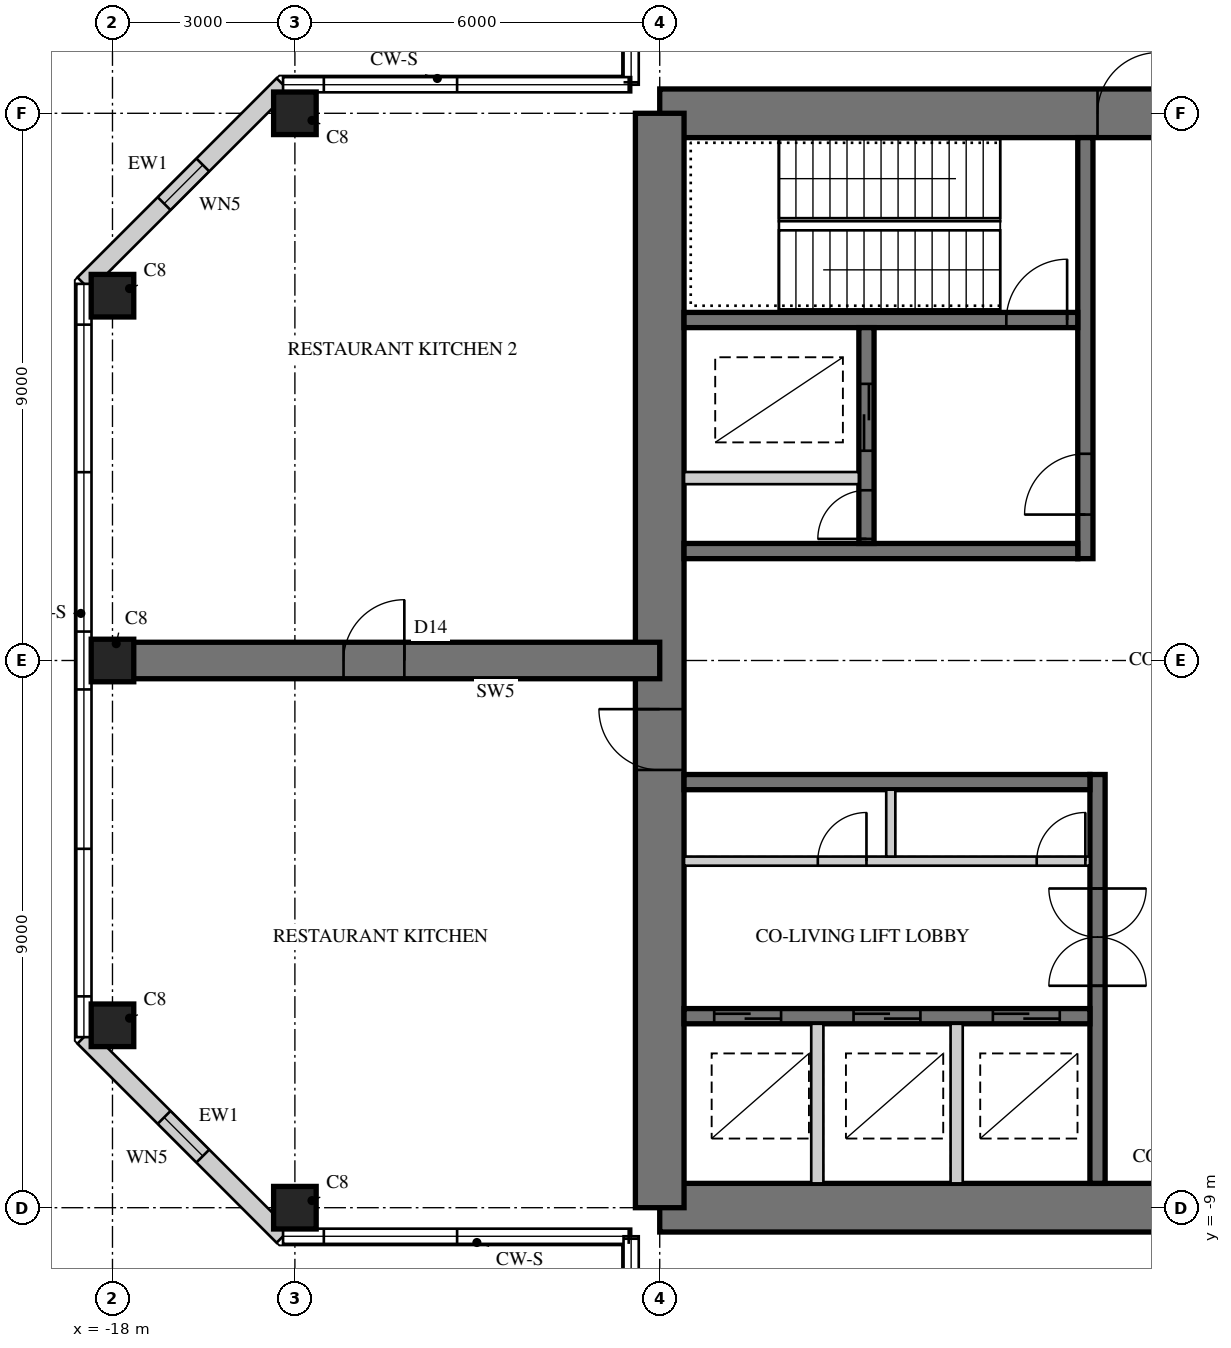
"""IFC4 building model, lengths in metres.
Left out: names, types, materials, properties, quantities, classifications, styles, units other than length and angle.
Written with IfcOpenShell. Run it as: python <this file> out.ifc"""

import sys

from ifc_helpers import new_model, si_unit, direction, frame, frame_2d, origin, origin_2d, place, context, subcontext, project, spatial, rectangle, hollow_rectangle, extrude, element, fill, save


model = new_model("IFC4")
c1 = context("Model", 3, precision=1e-05, world=origin(), true_north=direction((0.0, 1.0)))
c2 = subcontext(c1, "Body", "Model", "MODEL_VIEW")
j1 = project(units=[si_unit("LENGTHUNIT", "METRE"), si_unit("PLANEANGLEUNIT", "RADIAN")], contexts=[c1])
p1 = place(None, origin())
s1 = spatial("IfcSite", under=j1, at=p1, CompositionType="ELEMENT")
p2 = place(p1, origin())
s2 = spatial("IfcBuilding", under=s1, at=p2, CompositionType="ELEMENT")
p3 = place(p2, frame((0.0, 0.0, 288.3)))
s3 = spatial("IfcBuildingStorey", under=s2, at=p3, CompositionType="ELEMENT", Elevation=288.3)
p4 = place(p3, frame((9.0, 9.0, 0.0), z_axis=(0.0, 0.0, 1.0), x_axis=(-1.0, 0.0, 0.0)))
e1 = element("IfcWall", 1, at=p4, inside=s3, PredefinedType="SHEAR", context=c2, shape_type="SweptSolid", body=[
    extrude(rectangle(XDim=18.0, YDim=0.8, at=frame_2d((9.0, 0.0))), origin(), (0.0, 0.0, 1.0), 5.0),
])
p5 = place(p4, frame((9.8, 0.0, 0.0)))
e2 = element("IfcOpeningElement", 2, at=p5, cuts=e1, PredefinedType="OPENING", context=c2, shape_type="SweptSolid", body=[
    extrude(rectangle(XDim=1.0, YDim=2.4, at=frame_2d((0.5, 1.2))), frame((0.0, 0.41, 0.0), z_axis=(0.0, -1.0, 0.0), x_axis=(1.0, 0.0, 0.0)), (0.0, 0.0, 1.0), 0.82),
])
p6 = place(p3, frame((-9.0, -9.0, 0.0), z_axis=(0.0, 0.0, 1.0), x_axis=(1.0, 0.0, 0.0)))
e3 = element("IfcWall", 3, at=p6, inside=s3, PredefinedType="SHEAR", context=c2, shape_type="SweptSolid", body=[
    extrude(rectangle(XDim=18.0, YDim=0.8, at=frame_2d((9.0, 0.0))), origin(), (0.0, 0.0, 1.0), 5.0),
])
p7 = place(p6, frame((9.8, 0.0, 0.0)))
e4 = element("IfcOpeningElement", 4, at=p7, cuts=e3, PredefinedType="OPENING", context=c2, shape_type="SweptSolid", body=[
    extrude(rectangle(XDim=1.0, YDim=2.4, at=frame_2d((0.5, 1.2))), frame((0.0, 0.41, 0.0), z_axis=(0.0, -1.0, 0.0), x_axis=(1.0, 0.0, 0.0)), (0.0, 0.0, 1.0), 0.82),
])
p8 = place(p3, frame((-9.0, 9.0, 0.0), z_axis=(0.0, 0.0, 1.0), x_axis=(0.0, -1.0, 0.0)))
e5 = element("IfcWall", 5, at=p8, inside=s3, PredefinedType="SHEAR", context=c2, shape_type="SweptSolid", body=[
    extrude(rectangle(XDim=18.0, YDim=0.8, at=frame_2d((9.0, 0.0))), origin(), (0.0, 0.0, 1.0), 5.0),
])
p9 = place(p8, frame((9.8, 0.0, 0.0)))
e6 = element("IfcOpeningElement", 6, at=p9, cuts=e5, PredefinedType="OPENING", context=c2, shape_type="SweptSolid", body=[
    extrude(rectangle(XDim=1.0, YDim=2.4, at=frame_2d((0.5, 1.2))), frame((0.0, 0.41, 0.0), z_axis=(0.0, -1.0, 0.0), x_axis=(1.0, 0.0, 0.0)), (0.0, 0.0, 1.0), 0.82),
])
p10 = place(p3, frame((-2.0, 1.675, 0.0), z_axis=(0.0, 0.0, 1.0), x_axis=(0.0, 1.0, 0.0)))
e7 = element("IfcWall", 7, at=p10, inside=s3, PredefinedType="SHEAR", context=c2, shape_type="SweptSolid", body=[
    extrude(rectangle(XDim=6.925, YDim=0.25, at=frame_2d((3.462, 0.0))), origin(), (0.0, 0.0, 1.0), 5.0),
])
p11 = place(p10, frame((0.725, 0.0, 0.0)))
e8 = element("IfcOpeningElement", 8, at=p11, cuts=e7, PredefinedType="OPENING", context=c2, shape_type="SweptSolid", body=[
    extrude(rectangle(XDim=1.0, YDim=2.1, at=frame_2d((0.5, 1.05))), frame((0.0, 0.135, 0.0), z_axis=(0.0, -1.0, 0.0), x_axis=(1.0, 0.0, 0.0)), (0.0, 0.0, 1.0), 0.27),
])
p12 = place(p3, frame((-2.125, 1.8, 0.0), z_axis=(0.0, 0.0, 1.0), x_axis=(-1.0, 0.0, 0.0)))
e9 = element("IfcWall", 9, at=p12, inside=s3, PredefinedType="SHEAR", context=c2, shape_type="SweptSolid", body=[
    extrude(rectangle(XDim=6.475, YDim=0.25, at=frame_2d((3.238, 0.0))), origin(), (0.0, 0.0, 1.0), 5.0),
])
p13 = place(p3, frame((-2.125, 5.6, 0.0), z_axis=(0.0, 0.0, 1.0), x_axis=(-1.0, 0.0, 0.0)))
e10 = element("IfcWall", 10, at=p13, inside=s3, PredefinedType="SHEAR", context=c2, shape_type="SweptSolid", body=[
    extrude(rectangle(XDim=6.475, YDim=0.25, at=frame_2d((3.238, 0.0))), origin(), (0.0, 0.0, 1.0), 5.0),
])
p14 = place(p13, frame((0.175, 0.0, 0.0)))
e11 = element("IfcOpeningElement", 11, at=p14, cuts=e10, PredefinedType="OPENING", context=c2, shape_type="SweptSolid", body=[
    extrude(rectangle(XDim=1.0, YDim=2.1, at=frame_2d((0.5, 1.05))), frame((0.0, 0.135, 0.0), z_axis=(0.0, -1.0, 0.0), x_axis=(1.0, 0.0, 0.0)), (0.0, 0.0, 1.0), 0.27),
])
p15 = place(p3, frame((-5.6, 1.925, 0.0), z_axis=(0.0, 0.0, 1.0), x_axis=(0.0, 1.0, 0.0)))
e12 = element("IfcWall", 12, at=p15, inside=s3, PredefinedType="SHEAR", context=c2, shape_type="SweptSolid", body=[
    extrude(rectangle(XDim=3.55, YDim=0.25, at=frame_2d((1.775, 0.0))), origin(), (0.0, 0.0, 1.0), 5.0),
])
p16 = place(p15, frame((1.525, 0.0, 0.0)))
e13 = element("IfcOpeningElement", 13, at=p16, cuts=e12, PredefinedType="OPENING", context=c2, shape_type="SweptSolid", body=[
    extrude(rectangle(XDim=1.1, YDim=2.2, at=frame_2d((0.55, 1.1))), frame((0.0, 0.135, 0.0), z_axis=(0.0, -1.0, 0.0), x_axis=(1.0, 0.0, 0.0)), (0.0, 0.0, 1.0), 0.27),
])
p17 = place(p15, frame((0.075, 0.0, 0.0)))
e14 = element("IfcOpeningElement", 14, at=p17, cuts=e12, PredefinedType="OPENING", context=c2, shape_type="SweptSolid", body=[
    extrude(rectangle(XDim=0.8, YDim=2.1, at=frame_2d((0.4, 1.05))), frame((0.0, 0.135, 0.0), z_axis=(0.0, -1.0, 0.0), x_axis=(1.0, 0.0, 0.0)), (0.0, 0.0, 1.0), 0.27),
])
p18 = place(p3, frame((-5.725, 3.0, 0.0), z_axis=(0.0, 0.0, 1.0), x_axis=(-1.0, 0.0, 0.0)))
e15 = element("IfcWall", 15, at=p18, inside=s3, PredefinedType="PARTITIONING", context=c2, shape_type="SweptSolid", body=[
    extrude(rectangle(XDim=2.875, YDim=0.2, at=frame_2d((1.438, 0.0))), origin(), (0.0, 0.0, 1.0), 5.0),
])
p19 = place(p3, frame((-1.8, -1.875, 0.0), z_axis=(0.0, 0.0, 1.0), x_axis=(0.0, -1.0, 0.0)))
e16 = element("IfcWall", 16, at=p19, inside=s3, PredefinedType="SHEAR", context=c2, shape_type="SweptSolid", body=[
    extrude(rectangle(XDim=6.725, YDim=0.25, at=frame_2d((3.363, 0.0))), origin(), (0.0, 0.0, 1.0), 5.0),
])
p20 = place(p19, frame((1.875, 0.0, 0.0)))
e17 = element("IfcOpeningElement", 17, at=p20, cuts=e16, PredefinedType="OPENING", context=c2, shape_type="SweptSolid", body=[
    extrude(rectangle(XDim=1.6, YDim=2.4, at=frame_2d((0.8, 1.2))), frame((0.0, 0.135, 0.0), z_axis=(0.0, -1.0, 0.0), x_axis=(1.0, 0.0, 0.0)), (0.0, 0.0, 1.0), 0.27),
])
p21 = place(p3, frame((-1.925, -2.0, 0.0), z_axis=(0.0, 0.0, 1.0), x_axis=(-1.0, 0.0, 0.0)))
e18 = element("IfcWall", 18, at=p21, inside=s3, PredefinedType="SHEAR", context=c2, shape_type="SweptSolid", body=[
    extrude(rectangle(XDim=6.675, YDim=0.25, at=frame_2d((3.337, 0.0))), origin(), (0.0, 0.0, 1.0), 5.0),
])
p22 = place(p3, frame((-1.925, -5.85, 0.0), z_axis=(0.0, 0.0, 1.0), x_axis=(-1.0, 0.0, 0.0)))
e19 = element("IfcWall", 19, at=p22, inside=s3, PredefinedType="SHEAR", context=c2, shape_type="SweptSolid", body=[
    extrude(rectangle(XDim=6.675, YDim=0.25, at=frame_2d((3.337, 0.0))), origin(), (0.0, 0.0, 1.0), 5.0),
])
p23 = place(p22, frame((0.496, 0.0, 0.0)))
e20 = element("IfcOpeningElement", 20, at=p23, cuts=e19, PredefinedType="OPENING", context=c2, shape_type="SweptSolid", body=[
    extrude(rectangle(XDim=1.1, YDim=2.2, at=frame_2d((0.55, 1.1))), frame((0.0, 0.135, 0.0), z_axis=(0.0, -1.0, 0.0), x_axis=(1.0, 0.0, 0.0)), (0.0, 0.0, 1.0), 0.27),
])
p24 = place(p22, frame((2.788, 0.0, 0.0)))
e21 = element("IfcOpeningElement", 21, at=p24, cuts=e19, PredefinedType="OPENING", context=c2, shape_type="SweptSolid", body=[
    extrude(rectangle(XDim=1.1, YDim=2.2, at=frame_2d((0.55, 1.1))), frame((0.0, 0.135, 0.0), z_axis=(0.0, -1.0, 0.0), x_axis=(1.0, 0.0, 0.0)), (0.0, 0.0, 1.0), 0.27),
])
p25 = place(p22, frame((5.079, 0.0, 0.0)))
e22 = element("IfcOpeningElement", 22, at=p25, cuts=e19, PredefinedType="OPENING", context=c2, shape_type="SweptSolid", body=[
    extrude(rectangle(XDim=1.1, YDim=2.2, at=frame_2d((0.55, 1.1))), frame((0.0, 0.135, 0.0), z_axis=(0.0, -1.0, 0.0), x_axis=(1.0, 0.0, 0.0)), (0.0, 0.0, 1.0), 0.27),
])
p26 = place(p3, frame((-1.925, -3.3, 0.0), z_axis=(0.0, 0.0, 1.0), x_axis=(-1.0, 0.0, 0.0)))
e23 = element("IfcWall", 23, at=p26, inside=s3, PredefinedType="PARTITIONING", context=c2, shape_type="SweptSolid", body=[
    extrude(rectangle(XDim=6.675, YDim=0.15, at=frame_2d((3.337, 0.0))), origin(), (0.0, 0.0, 1.0), 5.0),
])
p27 = place(p26, frame((0.075, 0.0, 0.0)))
e24 = element("IfcOpeningElement", 24, at=p27, cuts=e23, PredefinedType="OPENING", context=c2, shape_type="SweptSolid", body=[
    extrude(rectangle(XDim=0.8, YDim=2.1, at=frame_2d((0.4, 1.05))), frame((0.0, 0.085, 0.0), z_axis=(0.0, -1.0, 0.0), x_axis=(1.0, 0.0, 0.0)), (0.0, 0.0, 1.0), 0.17),
])
p28 = place(p26, frame((3.675, 0.0, 0.0)))
e25 = element("IfcOpeningElement", 25, at=p28, cuts=e23, PredefinedType="OPENING", context=c2, shape_type="SweptSolid", body=[
    extrude(rectangle(XDim=0.8, YDim=2.1, at=frame_2d((0.4, 1.05))), frame((0.0, 0.085, 0.0), z_axis=(0.0, -1.0, 0.0), x_axis=(1.0, 0.0, 0.0)), (0.0, 0.0, 1.0), 0.17),
])
p29 = place(p3, frame((-5.2, -2.125, 0.0), z_axis=(0.0, 0.0, 1.0), x_axis=(0.0, -1.0, 0.0)))
e26 = element("IfcWall", 26, at=p29, inside=s3, PredefinedType="PARTITIONING", context=c2, shape_type="SweptSolid", body=[
    extrude(rectangle(XDim=1.1, YDim=0.15, at=frame_2d((0.55, 0.0))), origin(), (0.0, 0.0, 1.0), 5.0),
])
for number, where, z_axis, x_axis in (
    (27, (-4.117, -5.975, 0.0), (0.0, 0.0, 1.0), (0.0, -1.0, 0.0)),
    (28, (-6.408, -5.975, 0.0), (0.0, 0.0, 1.0), (0.0, -1.0, 0.0)),
):
    element("IfcWall", number, at=place(p3, frame(where, z_axis=z_axis, x_axis=x_axis)), inside=s3, PredefinedType="PARTITIONING", context=c2, shape_type="SweptSolid", body=[
        extrude(rectangle(XDim=2.625, YDim=0.2, at=frame_2d((1.312, 0.0))), origin(), (0.0, 0.0, 1.0), 5.0),
    ])
p30 = place(p3, frame((-9.0, 0.0, 0.0), z_axis=(0.0, 0.0, 1.0), x_axis=(-1.0, 0.0, 0.0)))
e29 = element("IfcWall", 29, at=p30, inside=s3, PredefinedType="SHEAR", context=c2, shape_type="SweptSolid", body=[
    extrude(rectangle(XDim=9.0, YDim=0.6, at=frame_2d((4.5, 0.0))), origin(), (0.0, 0.0, 1.0), 5.0),
])
p31 = place(p30, frame((4.2, 0.0, 0.0)))
e30 = element("IfcOpeningElement", 30, at=p31, cuts=e29, PredefinedType="OPENING", context=c2, shape_type="SweptSolid", body=[
    extrude(rectangle(XDim=1.0, YDim=2.2, at=frame_2d((0.5, 1.1))), frame((0.0, 0.31, 0.0), z_axis=(0.0, -1.0, 0.0), x_axis=(1.0, 0.0, 0.0)), (0.0, 0.0, 1.0), 0.62),
])
for number, where, z_axis, x_axis in (
    (31, (-15.0, 9.0, 0.0), (0.0, 0.0, 1.0), (1.0, 0.0, 0.0)),
    (32, (-15.0, -9.0, 0.0), (0.0, 0.0, 1.0), (1.0, 0.0, 0.0)),
    (33, (-18.0, 6.0, 0.0), (0.0, 0.0, 1.0), (1.0, 0.0, 0.0)),
    (34, (-18.0, 0.0, 0.0), (0.0, 0.0, 1.0), (1.0, 0.0, 0.0)),
    (35, (-18.0, -6.0, 0.0), (0.0, 0.0, 1.0), (1.0, 0.0, 0.0)),
):
    element("IfcColumn", number, at=place(p3, frame(where, z_axis=z_axis, x_axis=x_axis)), inside=s3, PredefinedType="COLUMN", context=c2, shape_type="SweptSolid", body=[
        extrude(rectangle(XDim=0.7, YDim=0.7, at=origin_2d()), origin(), (0.0, 0.0, 1.0), 5.0),
    ])
p32 = place(p3, frame((-15.195, 9.47, 0.0), z_axis=(0.0, 0.0, 1.0), x_axis=(-0.707106781187, -0.707106781187, 0.0)))
e36 = element("IfcWall", 36, at=p32, inside=s3, PredefinedType="SOLIDWALL", context=c2, shape_type="SweptSolid", body=[
    extrude(rectangle(XDim=4.632, YDim=0.3, at=frame_2d((2.316, 0.0))), origin(), (0.0, 0.0, 1.0), 4.75),
])
p33 = place(p32, frame((1.866, 0.0, 0.3)))
e37 = element("IfcOpeningElement", 37, at=p33, cuts=e36, PredefinedType="OPENING", context=c2, shape_type="SweptSolid", body=[
    extrude(rectangle(XDim=0.9, YDim=2.4, at=frame_2d((0.45, 1.2))), frame((0.0, 0.16, 0.0), z_axis=(0.0, -1.0, 0.0), x_axis=(1.0, 0.0, 0.0)), (0.0, 0.0, 1.0), 0.32),
])
p34 = place(p3, frame((-18.47, -6.195, 0.0), z_axis=(0.0, 0.0, 1.0), x_axis=(0.707106781187, -0.707106781187, 0.0)))
e38 = element("IfcWall", 38, at=p34, inside=s3, PredefinedType="SOLIDWALL", context=c2, shape_type="SweptSolid", body=[
    extrude(rectangle(XDim=4.632, YDim=0.3, at=frame_2d((2.316, 0.0))), origin(), (0.0, 0.0, 1.0), 4.75),
])
p35 = place(p34, frame((1.866, 0.0, 0.3)))
e39 = element("IfcOpeningElement", 39, at=p35, cuts=e38, PredefinedType="OPENING", context=c2, shape_type="SweptSolid", body=[
    extrude(rectangle(XDim=0.9, YDim=2.4, at=frame_2d((0.45, 1.2))), frame((0.0, 0.16, 0.0), z_axis=(0.0, -1.0, 0.0), x_axis=(1.0, 0.0, 0.0)), (0.0, 0.0, 1.0), 0.32),
])
p36 = place(p33, origin())
e40 = element("IfcWindow", 40, at=p36, inside=s3, PartitioningType="SINGLE_PANEL", PredefinedType="WINDOW", context=c2, shape_type="SweptSolid", body=[
    extrude(hollow_rectangle(XDim=0.9, YDim=2.4, WallThickness=0.06, at=frame_2d((0.45, 1.2))), frame((0.0, 0.03, 0.0), z_axis=(0.0, -1.0, 0.0), x_axis=(1.0, 0.0, 0.0)), (0.0, 0.0, 1.0), 0.06),
    extrude(rectangle(XDim=0.779, YDim=2.279, at=frame_2d((0.45, 1.2))), frame((0.0, 0.03, 0.0), z_axis=(0.0, -1.0, 0.0), x_axis=(1.0, 0.0, 0.0)), (0.0, 0.0, 1.0), 0.06),
])
fill(e37, e40)
p37 = place(p35, origin())
e41 = element("IfcWindow", 41, at=p37, inside=s3, PartitioningType="SINGLE_PANEL", PredefinedType="WINDOW", context=c2, shape_type="SweptSolid", body=[
    extrude(hollow_rectangle(XDim=0.9, YDim=2.4, WallThickness=0.06, at=frame_2d((0.45, 1.2))), frame((0.0, 0.03, 0.0), z_axis=(0.0, -1.0, 0.0), x_axis=(1.0, 0.0, 0.0)), (0.0, 0.0, 1.0), 0.06),
    extrude(rectangle(XDim=0.779, YDim=2.279, at=frame_2d((0.45, 1.2))), frame((0.0, 0.03, 0.0), z_axis=(0.0, -1.0, 0.0), x_axis=(1.0, 0.0, 0.0)), (0.0, 0.0, 1.0), 0.06),
])
fill(e39, e41)
p38 = place(p31, frame((1.0, 0.0, 0.0), z_axis=(0.0, 0.0, 1.0), x_axis=(-1.0, 0.0, 0.0)))
e42 = element("IfcDoor", 42, at=p38, inside=s3, OperationType="SINGLE_SWING_RIGHT", PredefinedType="DOOR", context=c2, shape_type="SweptSolid", body=[
    extrude(rectangle(XDim=1.0, YDim=2.2, at=frame_2d((0.5, 1.1))), frame((0.0, 0.025, 0.0), z_axis=(0.0, -1.0, 0.0), x_axis=(1.0, 0.0, 0.0)), (0.0, 0.0, 1.0), 0.05),
])
fill(e30, e42)
p39 = place(p5, frame((1.0, 0.0, 0.0), z_axis=(0.0, 0.0, 1.0), x_axis=(-1.0, 0.0, 0.0)))
e43 = element("IfcDoor", 43, at=p39, inside=s3, OperationType="SINGLE_SWING_RIGHT", PredefinedType="DOOR", context=c2, shape_type="SweptSolid", body=[
    extrude(rectangle(XDim=1.0, YDim=2.4, at=frame_2d((0.5, 1.2))), frame((0.0, -0.005, 0.0), z_axis=(0.0, -1.0, 0.0), x_axis=(1.0, 0.0, 0.0)), (0.0, 0.0, 1.0), 0.05),
])
fill(e2, e43)
p40 = place(p9, frame((1.0, 0.0, 0.0), z_axis=(0.0, 0.0, 1.0), x_axis=(-1.0, 0.0, 0.0)))
e44 = element("IfcDoor", 44, at=p40, inside=s3, OperationType="SINGLE_SWING_RIGHT", PredefinedType="DOOR", context=c2, shape_type="SweptSolid", body=[
    extrude(rectangle(XDim=1.0, YDim=2.4, at=frame_2d((0.5, 1.2))), frame((0.0, -0.005, 0.0), z_axis=(0.0, -1.0, 0.0), x_axis=(1.0, 0.0, 0.0)), (0.0, 0.0, 1.0), 0.05),
])
fill(e6, e44)
p41 = place(p11, origin())
e45 = element("IfcDoor", 45, at=p41, inside=s3, OperationType="SINGLE_SWING_LEFT", PredefinedType="DOOR", context=c2, shape_type="SweptSolid", body=[
    extrude(rectangle(XDim=1.0, YDim=2.1, at=frame_2d((0.5, 1.05))), frame((0.0, 0.025, 0.0), z_axis=(0.0, -1.0, 0.0), x_axis=(1.0, 0.0, 0.0)), (0.0, 0.0, 1.0), 0.05),
])
fill(e8, e45)
p42 = place(p14, frame((1.0, 0.0, 0.0), z_axis=(0.0, 0.0, 1.0), x_axis=(-1.0, 0.0, 0.0)))
e46 = element("IfcDoor", 46, at=p42, inside=s3, OperationType="SINGLE_SWING_RIGHT", PredefinedType="DOOR", context=c2, shape_type="SweptSolid", body=[
    extrude(rectangle(XDim=1.0, YDim=2.1, at=frame_2d((0.5, 1.05))), frame((0.0, 0.025, 0.0), z_axis=(0.0, -1.0, 0.0), x_axis=(1.0, 0.0, 0.0)), (0.0, 0.0, 1.0), 0.05),
])
fill(e11, e46)
p43 = place(p16, origin())
e47 = element("IfcDoor", 47, at=p43, inside=s3, OperationType="DOUBLE_DOOR_SLIDING", PredefinedType="DOOR", context=c2, shape_type="SweptSolid", body=[
    extrude(rectangle(XDim=1.1, YDim=2.2, at=frame_2d((0.55, 1.1))), frame((0.0, 0.025, 0.0), z_axis=(0.0, -1.0, 0.0), x_axis=(1.0, 0.0, 0.0)), (0.0, 0.0, 1.0), 0.05),
])
fill(e13, e47)
p44 = place(p17, origin())
e48 = element("IfcDoor", 48, at=p44, inside=s3, OperationType="SINGLE_SWING_LEFT", PredefinedType="DOOR", context=c2, shape_type="SweptSolid", body=[
    extrude(rectangle(XDim=0.8, YDim=2.1, at=frame_2d((0.4, 1.05))), frame((0.0, 0.025, 0.0), z_axis=(0.0, -1.0, 0.0), x_axis=(1.0, 0.0, 0.0)), (0.0, 0.0, 1.0), 0.05),
])
fill(e14, e48)
p45 = place(p23, origin())
e49 = element("IfcDoor", 49, at=p45, inside=s3, OperationType="DOUBLE_DOOR_SLIDING", PredefinedType="DOOR", context=c2, shape_type="SweptSolid", body=[
    extrude(rectangle(XDim=1.1, YDim=2.2, at=frame_2d((0.55, 1.1))), frame((0.0, 0.025, 0.0), z_axis=(0.0, -1.0, 0.0), x_axis=(1.0, 0.0, 0.0)), (0.0, 0.0, 1.0), 0.05),
])
fill(e20, e49)
p46 = place(p24, origin())
e50 = element("IfcDoor", 50, at=p46, inside=s3, OperationType="DOUBLE_DOOR_SLIDING", PredefinedType="DOOR", context=c2, shape_type="SweptSolid", body=[
    extrude(rectangle(XDim=1.1, YDim=2.2, at=frame_2d((0.55, 1.1))), frame((0.0, 0.025, 0.0), z_axis=(0.0, -1.0, 0.0), x_axis=(1.0, 0.0, 0.0)), (0.0, 0.0, 1.0), 0.05),
])
fill(e21, e50)
p47 = place(p25, origin())
e51 = element("IfcDoor", 51, at=p47, inside=s3, OperationType="DOUBLE_DOOR_SLIDING", PredefinedType="DOOR", context=c2, shape_type="SweptSolid", body=[
    extrude(rectangle(XDim=1.1, YDim=2.2, at=frame_2d((0.55, 1.1))), frame((0.0, 0.025, 0.0), z_axis=(0.0, -1.0, 0.0), x_axis=(1.0, 0.0, 0.0)), (0.0, 0.0, 1.0), 0.05),
])
fill(e22, e51)
p48 = place(p20, origin())
e52 = element("IfcDoor", 52, at=p48, inside=s3, OperationType="DOUBLE_DOOR_DOUBLE_SWING", PredefinedType="DOOR", context=c2, shape_type="SweptSolid", body=[
    extrude(rectangle(XDim=1.6, YDim=2.4, at=frame_2d((0.8, 1.2))), frame((0.0, 0.025, 0.0), z_axis=(0.0, -1.0, 0.0), x_axis=(1.0, 0.0, 0.0)), (0.0, 0.0, 1.0), 0.05),
])
fill(e17, e52)
p49 = place(p27, frame((0.8, 0.0, 0.0), z_axis=(0.0, 0.0, 1.0), x_axis=(-1.0, 0.0, 0.0)))
e53 = element("IfcDoor", 53, at=p49, inside=s3, OperationType="SINGLE_SWING_RIGHT", PredefinedType="DOOR", context=c2, shape_type="SweptSolid", body=[
    extrude(rectangle(XDim=0.8, YDim=2.1, at=frame_2d((0.4, 1.05))), frame((0.0, 0.025, 0.0), z_axis=(0.0, -1.0, 0.0), x_axis=(1.0, 0.0, 0.0)), (0.0, 0.0, 1.0), 0.05),
])
fill(e24, e53)
p50 = place(p28, frame((0.8, 0.0, 0.0), z_axis=(0.0, 0.0, 1.0), x_axis=(-1.0, 0.0, 0.0)))
e54 = element("IfcDoor", 54, at=p50, inside=s3, OperationType="SINGLE_SWING_RIGHT", PredefinedType="DOOR", context=c2, shape_type="SweptSolid", body=[
    extrude(rectangle(XDim=0.8, YDim=2.1, at=frame_2d((0.4, 1.05))), frame((0.0, 0.025, 0.0), z_axis=(0.0, -1.0, 0.0), x_axis=(1.0, 0.0, 0.0)), (0.0, 0.0, 1.0), 0.05),
])
fill(e25, e54)
save(model, sys.argv[1])
